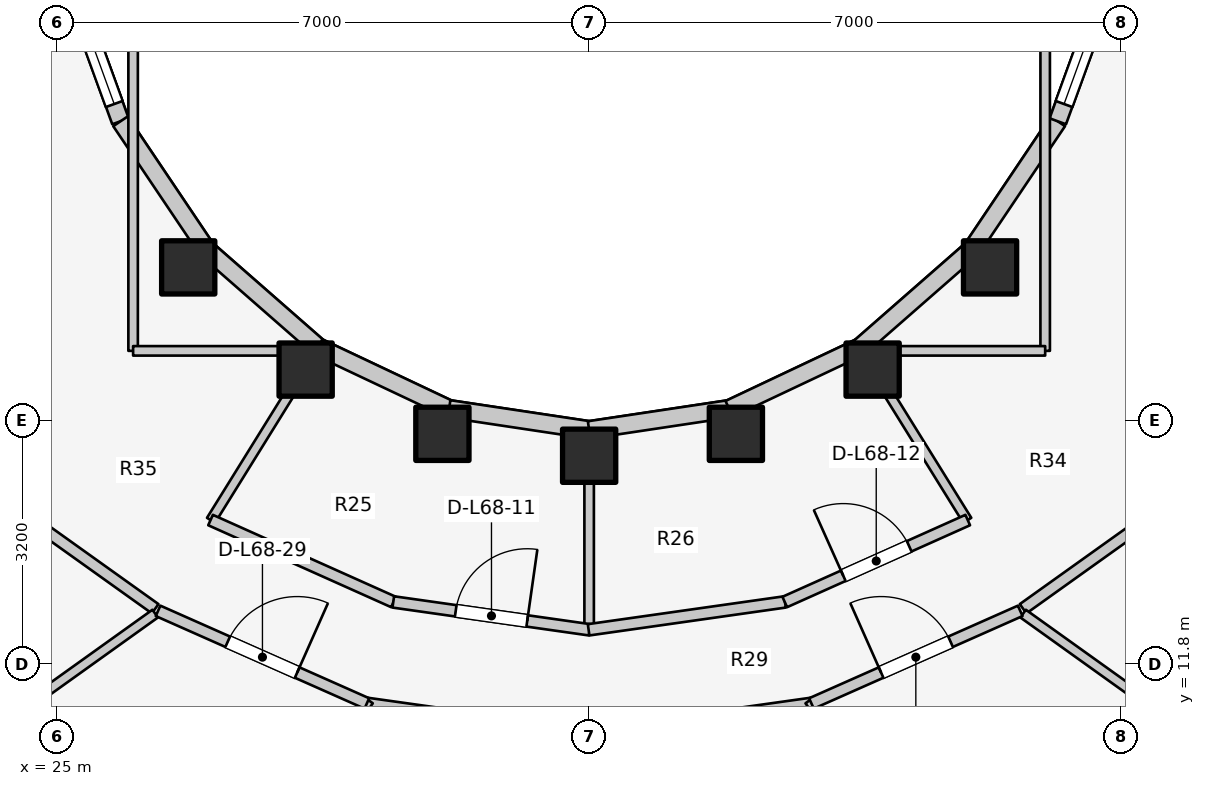
"""IFC4 building model, lengths in metres.
Left out: names, types, materials, properties, quantities, classifications, styles, units other than length and angle.
Written with IfcOpenShell. Run it as: python <this file> out.ifc"""

import sys

from ifc_helpers import new_model, si_unit, direction, frame, frame_2d, origin, origin_2d, place, context, subcontext, project, spatial, rectangle, extrude, element, fill, save


model = new_model("IFC4")
c1 = context("Model", 3, precision=1e-05, world=origin(), true_north=direction((0.0, 1.0)))
c2 = subcontext(c1, "Body", "Model", "MODEL_VIEW")
j1 = project(units=[si_unit("LENGTHUNIT", "METRE"), si_unit("PLANEANGLEUNIT", "RADIAN")], contexts=[c1])
p1 = place(None, origin())
s1 = spatial("IfcSite", under=j1, at=p1, CompositionType="ELEMENT")
p2 = place(p1, origin())
s2 = spatial("IfcBuilding", under=s1, at=p2, CompositionType="ELEMENT")
p3 = place(p2, frame((0.0, 0.0, 223.3)))
s3 = spatial("IfcBuildingStorey", under=s2, at=p3, CompositionType="ELEMENT", Elevation=223.3)
for number, where, z_axis, x_axis in (
    (1, (26.725, 17.018, 0.0), (0.0, 0.0, 1.0), (1.0, 0.0, 0.0)),
    (2, (28.27, 15.673, 0.0), (0.0, 0.0, 1.0), (1.0, 0.0, 0.0)),
    (3, (30.069, 14.828, 0.0), (0.0, 0.0, 1.0), (1.0, 0.0, 0.0)),
    (4, (32.0, 14.54, 0.0), (0.0, 0.0, 1.0), (1.0, 0.0, 0.0)),
    (5, (33.931, 14.828, 0.0), (0.0, 0.0, 1.0), (1.0, 0.0, 0.0)),
    (6, (35.73, 15.673, 0.0), (0.0, 0.0, 1.0), (1.0, 0.0, 0.0)),
    (7, (37.275, 17.018, 0.0), (0.0, 0.0, 1.0), (1.0, 0.0, 0.0)),
):
    element("IfcColumn", number, at=place(p3, frame(where, z_axis=z_axis, x_axis=x_axis)), inside=s3, PredefinedType="COLUMN", context=c2, shape_type="SweptSolid", body=[
        extrude(rectangle(XDim=0.7, YDim=0.7, at=origin_2d()), origin(), (0.0, 0.0, 1.0), 3.1),
    ])
p4 = place(p3, frame((25.123, 20.898, 0.0), z_axis=(0.0, 0.0, 1.0), x_axis=(0.341423187295, -0.93990968033, 0.0)))
e8 = element("IfcWall", 8, at=p4, inside=s3, PredefinedType="STANDARD", context=c2, shape_type="SweptSolid", body=[
    extrude(rectangle(XDim=2.084, YDim=0.23, at=frame_2d((1.042, 0.0))), origin(), (0.0, 0.0, 1.0), 2.84),
])
p5 = place(p4, frame((0.242, 0.0, 0.85)))
e9 = element("IfcOpeningElement", 9, at=p5, cuts=e8, PredefinedType="OPENING", context=c2, shape_type="SweptSolid", body=[
    extrude(rectangle(XDim=1.6, YDim=1.65, at=frame_2d((0.8, 0.825))), frame((0.0, 0.125, 0.0), z_axis=(0.0, -1.0, 0.0), x_axis=(1.0, 0.0, 0.0)), (0.0, 0.0, 1.0), 0.25),
])
p6 = place(p3, frame((25.834, 18.94, 0.0), z_axis=(0.0, 0.0, 1.0), x_axis=(0.558197800898, -0.829707909492, 0.0)))
e10 = element("IfcWall", 10, at=p6, inside=s3, PredefinedType="STANDARD", context=c2, shape_type="SweptSolid", body=[
    extrude(rectangle(XDim=2.027, YDim=0.23, at=frame_2d((1.013, 0.0))), origin(), (0.0, 0.0, 1.0), 2.16),
])
p7 = place(p3, frame((26.965, 17.258, 0.0), z_axis=(0.0, 0.0, 1.0), x_axis=(0.752576694707, -0.658504607869, 0.0)))
e11 = element("IfcWall", 11, at=p7, inside=s3, PredefinedType="STANDARD", context=c2, shape_type="SweptSolid", body=[
    extrude(rectangle(XDim=1.959, YDim=0.23, at=frame_2d((0.98, 0.0))), origin(), (0.0, 0.0, 1.0), 2.16),
])
p8 = place(p3, frame((28.44, 15.968, 0.0), z_axis=(0.0, 0.0, 1.0), x_axis=(0.904179699603, -0.427152280606, 0.0)))
e12 = element("IfcWall", 12, at=p8, inside=s3, PredefinedType="STANDARD", context=c2, shape_type="SweptSolid", body=[
    extrude(rectangle(XDim=1.899, YDim=0.23, at=frame_2d((0.95, 0.0))), origin(), (0.0, 0.0, 1.0), 2.16),
])
for number, where, z_axis, x_axis in (
    (13, (30.157, 15.157, 0.0), (0.0, 0.0, 1.0), (0.989, -0.149, 0.0)),
    (14, (32.0, 14.88, 0.0), (0.0, 0.0, 1.0), (0.989, 0.149, 0.0)),
):
    element("IfcWall", number, at=place(p3, frame(where, z_axis=z_axis, x_axis=x_axis)), inside=s3, PredefinedType="STANDARD", context=c2, shape_type="SweptSolid", body=[
        extrude(rectangle(XDim=1.864, YDim=0.23, at=frame_2d((0.932, 0.0))), origin(), (0.0, 0.0, 1.0), 2.16),
    ])
p9 = place(p3, frame((33.843, 15.157, 0.0), z_axis=(0.0, 0.0, 1.0), x_axis=(0.904179699603, 0.427152280606, 0.0)))
e15 = element("IfcWall", 15, at=p9, inside=s3, PredefinedType="STANDARD", context=c2, shape_type="SweptSolid", body=[
    extrude(rectangle(XDim=1.899, YDim=0.23, at=frame_2d((0.95, 0.0))), origin(), (0.0, 0.0, 1.0), 2.16),
])
p10 = place(p3, frame((35.56, 15.968, 0.0), z_axis=(0.0, 0.0, 1.0), x_axis=(0.752576694707, 0.658504607869, 0.0)))
e16 = element("IfcWall", 16, at=p10, inside=s3, PredefinedType="STANDARD", context=c2, shape_type="SweptSolid", body=[
    extrude(rectangle(XDim=1.959, YDim=0.23, at=frame_2d((0.98, 0.0))), origin(), (0.0, 0.0, 1.0), 2.16),
])
p11 = place(p3, frame((37.035, 17.258, 0.0), z_axis=(0.0, 0.0, 1.0), x_axis=(0.558197800898, 0.829707909492, 0.0)))
e17 = element("IfcWall", 17, at=p11, inside=s3, PredefinedType="STANDARD", context=c2, shape_type="SweptSolid", body=[
    extrude(rectangle(XDim=2.027, YDim=0.23, at=frame_2d((1.013, 0.0))), origin(), (0.0, 0.0, 1.0), 2.16),
])
p12 = place(p3, frame((38.166, 18.94, 0.0), z_axis=(0.0, 0.0, 1.0), x_axis=(0.341423187295, 0.93990968033, 0.0)))
e18 = element("IfcWall", 18, at=p12, inside=s3, PredefinedType="STANDARD", context=c2, shape_type="SweptSolid", body=[
    extrude(rectangle(XDim=2.084, YDim=0.23, at=frame_2d((1.042, 0.0))), origin(), (0.0, 0.0, 1.0), 2.84),
])
p13 = place(p12, frame((0.242, 0.0, 0.85)))
e19 = element("IfcOpeningElement", 19, at=p13, cuts=e18, PredefinedType="OPENING", context=c2, shape_type="SweptSolid", body=[
    extrude(rectangle(XDim=1.6, YDim=1.65, at=frame_2d((0.8, 0.825))), frame((0.0, 0.125, 0.0), z_axis=(0.0, -1.0, 0.0), x_axis=(1.0, 0.0, 0.0)), (0.0, 0.0, 1.0), 0.25),
])
p14 = place(p3, frame((28.45, 15.985, 0.0), z_axis=(0.0, 0.0, 1.0), x_axis=(-0.527527080983, -0.849538215049, 0.0)))
e20 = element("IfcWall", 20, at=p14, inside=s3, PredefinedType="PARTITIONING", context=c2, shape_type="SweptSolid", body=[
    extrude(rectangle(XDim=2.701, YDim=0.125, at=frame_2d((1.351, 0.0))), origin(), (0.0, 0.0, 1.0), 2.376),
])
p15 = place(p3, frame((32.0, 14.9, 0.0), z_axis=(0.0, 0.0, 1.0), x_axis=(0.0, -1.0, 0.0)))
e21 = element("IfcWall", 21, at=p15, inside=s3, PredefinedType="PARTITIONING", context=c2, shape_type="SweptSolid", body=[
    extrude(rectangle(XDim=2.65, YDim=0.125, at=frame_2d((1.325, 0.0))), origin(), (0.0, 0.0, 1.0), 2.376),
])
p16 = place(p3, frame((35.55, 15.985, 0.0), z_axis=(0.0, 0.0, 1.0), x_axis=(0.527527080983, -0.849538215049, 0.0)))
e22 = element("IfcWall", 22, at=p16, inside=s3, PredefinedType="PARTITIONING", context=c2, shape_type="SweptSolid", body=[
    extrude(rectangle(XDim=2.701, YDim=0.125, at=frame_2d((1.351, 0.0))), origin(), (0.0, 0.0, 1.0), 2.376),
])
p17 = place(p3, frame((27.019, 13.694, 0.0), z_axis=(0.0, 0.0, 1.0), x_axis=(0.912628408652, -0.408790151203, 0.0)))
e23 = element("IfcWall", 23, at=p17, inside=s3, PredefinedType="PARTITIONING", context=c2, shape_type="SweptSolid", body=[
    extrude(rectangle(XDim=2.638, YDim=0.15, at=frame_2d((1.319, 0.0))), origin(), (0.0, 0.0, 1.0), 2.376),
])
p18 = place(p3, frame((29.423, 12.617, 0.0), z_axis=(0.0, 0.0, 1.0), x_axis=(0.990078185178, -0.140517569133, 0.0)))
e24 = element("IfcWall", 24, at=p18, inside=s3, PredefinedType="PARTITIONING", context=c2, shape_type="SweptSolid", body=[
    extrude(rectangle(XDim=2.61, YDim=0.15, at=frame_2d((1.305, 0.0))), origin(), (0.0, 0.0, 1.0), 2.376),
])
p19 = place(p18, frame((0.83, 0.0, 0.0)))
e25 = element("IfcOpeningElement", 25, at=p19, cuts=e24, PredefinedType="OPENING", context=c2, shape_type="SweptSolid", body=[
    extrude(rectangle(XDim=0.95, YDim=2.1, at=frame_2d((0.475, 1.05))), frame((0.0, 0.085, 0.0), z_axis=(0.0, -1.0, 0.0), x_axis=(1.0, 0.0, 0.0)), (0.0, 0.0, 1.0), 0.17),
])
p20 = place(p3, frame((31.993, 12.25, 0.0), z_axis=(0.0, 0.0, 1.0), x_axis=(0.990078185178, 0.140517569133, 0.0)))
e26 = element("IfcWall", 26, at=p20, inside=s3, PredefinedType="PARTITIONING", context=c2, shape_type="SweptSolid", body=[
    extrude(rectangle(XDim=2.61, YDim=0.15, at=frame_2d((1.305, 0.0))), origin(), (0.0, 0.0, 1.0), 2.376),
])
p21 = place(p3, frame((34.573, 12.616, 0.0), z_axis=(0.0, 0.0, 1.0), x_axis=(0.912628408652, 0.408790151203, 0.0)))
e27 = element("IfcWall", 27, at=p21, inside=s3, PredefinedType="PARTITIONING", context=c2, shape_type="SweptSolid", body=[
    extrude(rectangle(XDim=2.638, YDim=0.15, at=frame_2d((1.319, 0.0))), origin(), (0.0, 0.0, 1.0), 2.376),
])
p22 = place(p21, frame((0.844, 0.0, 0.0)))
e28 = element("IfcOpeningElement", 28, at=p22, cuts=e27, PredefinedType="OPENING", context=c2, shape_type="SweptSolid", body=[
    extrude(rectangle(XDim=0.95, YDim=2.1, at=frame_2d((0.475, 1.05))), frame((0.0, 0.085, 0.0), z_axis=(0.0, -1.0, 0.0), x_axis=(1.0, 0.0, 0.0)), (0.0, 0.0, 1.0), 0.17),
])
p23 = place(p3, frame((26.0, 15.92, 0.0), z_axis=(0.0, 0.0, 1.0), x_axis=(0.0, 1.0, 0.0)))
e29 = element("IfcWall", 29, at=p23, inside=s3, PredefinedType="PARTITIONING", context=c2, shape_type="SweptSolid", body=[
    extrude(rectangle(XDim=4.28, YDim=0.125, at=frame_2d((2.14, 0.0))), origin(), (0.0, 0.0, 1.0), 2.232),
])
p24 = place(p3, frame((26.0, 15.92, 0.0), z_axis=(0.0, 0.0, 1.0), x_axis=(1.0, 0.0, 0.0)))
e30 = element("IfcWall", 30, at=p24, inside=s3, PredefinedType="PARTITIONING", context=c2, shape_type="SweptSolid", body=[
    extrude(rectangle(XDim=2.6, YDim=0.125, at=frame_2d((1.3, 0.0))), origin(), (0.0, 0.0, 1.0), 2.232),
])
p25 = place(p3, frame((38.0, 15.92, 0.0), z_axis=(0.0, 0.0, 1.0), x_axis=(0.0, 1.0, 0.0)))
e31 = element("IfcWall", 31, at=p25, inside=s3, PredefinedType="PARTITIONING", context=c2, shape_type="SweptSolid", body=[
    extrude(rectangle(XDim=4.28, YDim=0.125, at=frame_2d((2.14, 0.0))), origin(), (0.0, 0.0, 1.0), 2.232),
])
p26 = place(p3, frame((35.4, 15.92, 0.0), z_axis=(0.0, 0.0, 1.0), x_axis=(1.0, 0.0, 0.0)))
e32 = element("IfcWall", 32, at=p26, inside=s3, PredefinedType="PARTITIONING", context=c2, shape_type="SweptSolid", body=[
    extrude(rectangle(XDim=2.6, YDim=0.125, at=frame_2d((1.3, 0.0))), origin(), (0.0, 0.0, 1.0), 2.232),
])
for number, where, z_axis, x_axis in (
    (33, (26.29, 12.527, 0.0), (0.0, 0.0, 1.0), (-0.814, 0.581, 0.0)),
    (34, (37.71, 12.527, 0.0), (0.0, 0.0, 1.0), (0.814, 0.581, 0.0)),
):
    element("IfcWall", number, at=place(p3, frame(where, z_axis=z_axis, x_axis=x_axis)), inside=s3, PredefinedType="PARTITIONING", context=c2, shape_type="SweptSolid", body=[
        extrude(rectangle(XDim=2.082, YDim=0.15, at=frame_2d((1.041, 0.0))), origin(), (0.0, 0.0, 1.0), 2.376),
    ])
for number, where, z_axis, x_axis in (
    (35, (26.29, 12.463, 0.0), (0.0, 0.0, 1.0), (-0.813, -0.582, 0.0)),
    (36, (37.71, 12.463, 0.0), (0.0, 0.0, 1.0), (0.813, -0.582, 0.0)),
):
    element("IfcWall", number, at=place(p3, frame(where, z_axis=z_axis, x_axis=x_axis)), inside=s3, PredefinedType="PARTITIONING", context=c2, shape_type="SweptSolid", body=[
        extrude(rectangle(XDim=6.955, YDim=0.125, at=frame_2d((3.477, 0.0))), origin(), (0.0, 0.0, 1.0), 2.376),
    ])
p27 = place(p3, frame((29.018, 11.29, 0.0), z_axis=(0.0, 0.0, 1.0), x_axis=(0.990214091671, -0.13955662885, 0.0)))
e37 = element("IfcWall", 37, at=p27, inside=s3, PredefinedType="PARTITIONING", context=c2, shape_type="SweptSolid", body=[
    extrude(rectangle(XDim=3.062, YDim=0.15, at=frame_2d((1.531, 0.0))), origin(), (0.0, 0.0, 1.0), 2.376),
])
p28 = place(p3, frame((29.097, 11.324, 0.0), z_axis=(0.0, 0.0, 1.0), x_axis=(-0.583259891741, -0.812285601673, 0.0)))
e38 = element("IfcWall", 38, at=p28, inside=s3, PredefinedType="PLUMBINGWALL", context=c2, shape_type="SweptSolid", body=[
    extrude(rectangle(XDim=2.1, YDim=0.14, at=frame_2d((1.05, 0.0))), origin(), (0.0, 0.0, 1.0), 2.385),
])
p29 = place(p3, frame((26.328, 12.499, 0.0), z_axis=(0.0, 0.0, 1.0), x_axis=(0.914139569865, -0.405399613724, 0.0)))
e39 = element("IfcWall", 39, at=p29, inside=s3, PredefinedType="PARTITIONING", context=c2, shape_type="SweptSolid", body=[
    extrude(rectangle(XDim=3.005, YDim=0.15, at=frame_2d((1.502, 0.0))), origin(), (0.0, 0.0, 1.0), 2.376),
])
p30 = place(p29, frame((1.002, 0.0, 0.0)))
e40 = element("IfcOpeningElement", 40, at=p30, cuts=e39, PredefinedType="OPENING", context=c2, shape_type="SweptSolid", body=[
    extrude(rectangle(XDim=1.0, YDim=2.1, at=frame_2d((0.5, 1.05))), frame((0.0, 0.085, 0.0), z_axis=(0.0, -1.0, 0.0), x_axis=(1.0, 0.0, 0.0)), (0.0, 0.0, 1.0), 0.17),
])
p31 = place(p3, frame((31.95, 10.863, 0.0), z_axis=(0.0, 0.0, 1.0), x_axis=(0.990214091671, 0.13955662885, 0.0)))
e41 = element("IfcWall", 41, at=p31, inside=s3, PredefinedType="PARTITIONING", context=c2, shape_type="SweptSolid", body=[
    extrude(rectangle(XDim=3.062, YDim=0.15, at=frame_2d((1.531, 0.0))), origin(), (0.0, 0.0, 1.0), 2.376),
])
p32 = place(p3, frame((34.903, 11.324, 0.0), z_axis=(0.0, 0.0, 1.0), x_axis=(0.583259891741, -0.812285601673, 0.0)))
e42 = element("IfcWall", 42, at=p32, inside=s3, PredefinedType="PLUMBINGWALL", context=c2, shape_type="SweptSolid", body=[
    extrude(rectangle(XDim=2.1, YDim=0.14, at=frame_2d((1.05, 0.0))), origin(), (0.0, 0.0, 1.0), 2.385),
])
p33 = place(p3, frame((34.925, 11.281, 0.0), z_axis=(0.0, 0.0, 1.0), x_axis=(0.914139569865, 0.405399613724, 0.0)))
e43 = element("IfcWall", 43, at=p33, inside=s3, PredefinedType="PARTITIONING", context=c2, shape_type="SweptSolid", body=[
    extrude(rectangle(XDim=3.005, YDim=0.15, at=frame_2d((1.502, 0.0))), origin(), (0.0, 0.0, 1.0), 2.376),
])
p34 = place(p33, frame((1.002, 0.0, 0.0)))
e44 = element("IfcOpeningElement", 44, at=p34, cuts=e43, PredefinedType="OPENING", context=c2, shape_type="SweptSolid", body=[
    extrude(rectangle(XDim=1.0, YDim=2.1, at=frame_2d((0.5, 1.05))), frame((0.0, 0.085, 0.0), z_axis=(0.0, -1.0, 0.0), x_axis=(1.0, 0.0, 0.0)), (0.0, 0.0, 1.0), 0.17),
])
p35 = place(p5, origin())
e45 = element("IfcWindow", 45, at=p35, inside=s3, PartitioningType="SINGLE_PANEL", PredefinedType="WINDOW", context=c2, shape_type="SweptSolid", body=[
    extrude(rectangle(XDim=1.6, YDim=1.65, at=frame_2d((0.8, 0.825))), frame((0.0, 0.03, 0.0), z_axis=(0.0, -1.0, 0.0), x_axis=(1.0, 0.0, 0.0)), (0.0, 0.0, 1.0), 0.06),
])
fill(e9, e45)
p36 = place(p13, origin())
e46 = element("IfcWindow", 46, at=p36, inside=s3, PartitioningType="SINGLE_PANEL", PredefinedType="WINDOW", context=c2, shape_type="SweptSolid", body=[
    extrude(rectangle(XDim=1.6, YDim=1.65, at=frame_2d((0.8, 0.825))), frame((0.0, 0.03, 0.0), z_axis=(0.0, -1.0, 0.0), x_axis=(1.0, 0.0, 0.0)), (0.0, 0.0, 1.0), 0.06),
])
fill(e19, e46)
p37 = place(p19, origin())
e47 = element("IfcDoor", 47, at=p37, inside=s3, OperationType="SINGLE_SWING_RIGHT", PredefinedType="DOOR", context=c2, shape_type="SweptSolid", body=[
    extrude(rectangle(XDim=0.95, YDim=2.1, at=frame_2d((0.475, 1.05))), frame((0.0, 0.025, 0.0), z_axis=(0.0, -1.0, 0.0), x_axis=(1.0, 0.0, 0.0)), (0.0, 0.0, 1.0), 0.05),
])
fill(e25, e47)
p38 = place(p22, origin())
e48 = element("IfcDoor", 48, at=p38, inside=s3, OperationType="SINGLE_SWING_LEFT", PredefinedType="DOOR", context=c2, shape_type="SweptSolid", body=[
    extrude(rectangle(XDim=0.95, YDim=2.1, at=frame_2d((0.475, 1.05))), frame((0.0, 0.025, 0.0), z_axis=(0.0, -1.0, 0.0), x_axis=(1.0, 0.0, 0.0)), (0.0, 0.0, 1.0), 0.05),
])
fill(e28, e48)
p39 = place(p30, origin())
e49 = element("IfcDoor", 49, at=p39, inside=s3, OperationType="SINGLE_SWING_RIGHT", PredefinedType="DOOR", context=c2, shape_type="SweptSolid", body=[
    extrude(rectangle(XDim=1.0, YDim=2.1, at=frame_2d((0.5, 1.05))), frame((0.0, 0.025, 0.0), z_axis=(0.0, -1.0, 0.0), x_axis=(1.0, 0.0, 0.0)), (0.0, 0.0, 1.0), 0.05),
])
fill(e40, e49)
p40 = place(p34, origin())
e50 = element("IfcDoor", 50, at=p40, inside=s3, OperationType="SINGLE_SWING_LEFT", PredefinedType="DOOR", context=c2, shape_type="SweptSolid", body=[
    extrude(rectangle(XDim=1.0, YDim=2.1, at=frame_2d((0.5, 1.05))), frame((0.0, 0.025, 0.0), z_axis=(0.0, -1.0, 0.0), x_axis=(1.0, 0.0, 0.0)), (0.0, 0.0, 1.0), 0.05),
])
fill(e44, e50)
save(model, sys.argv[1])
